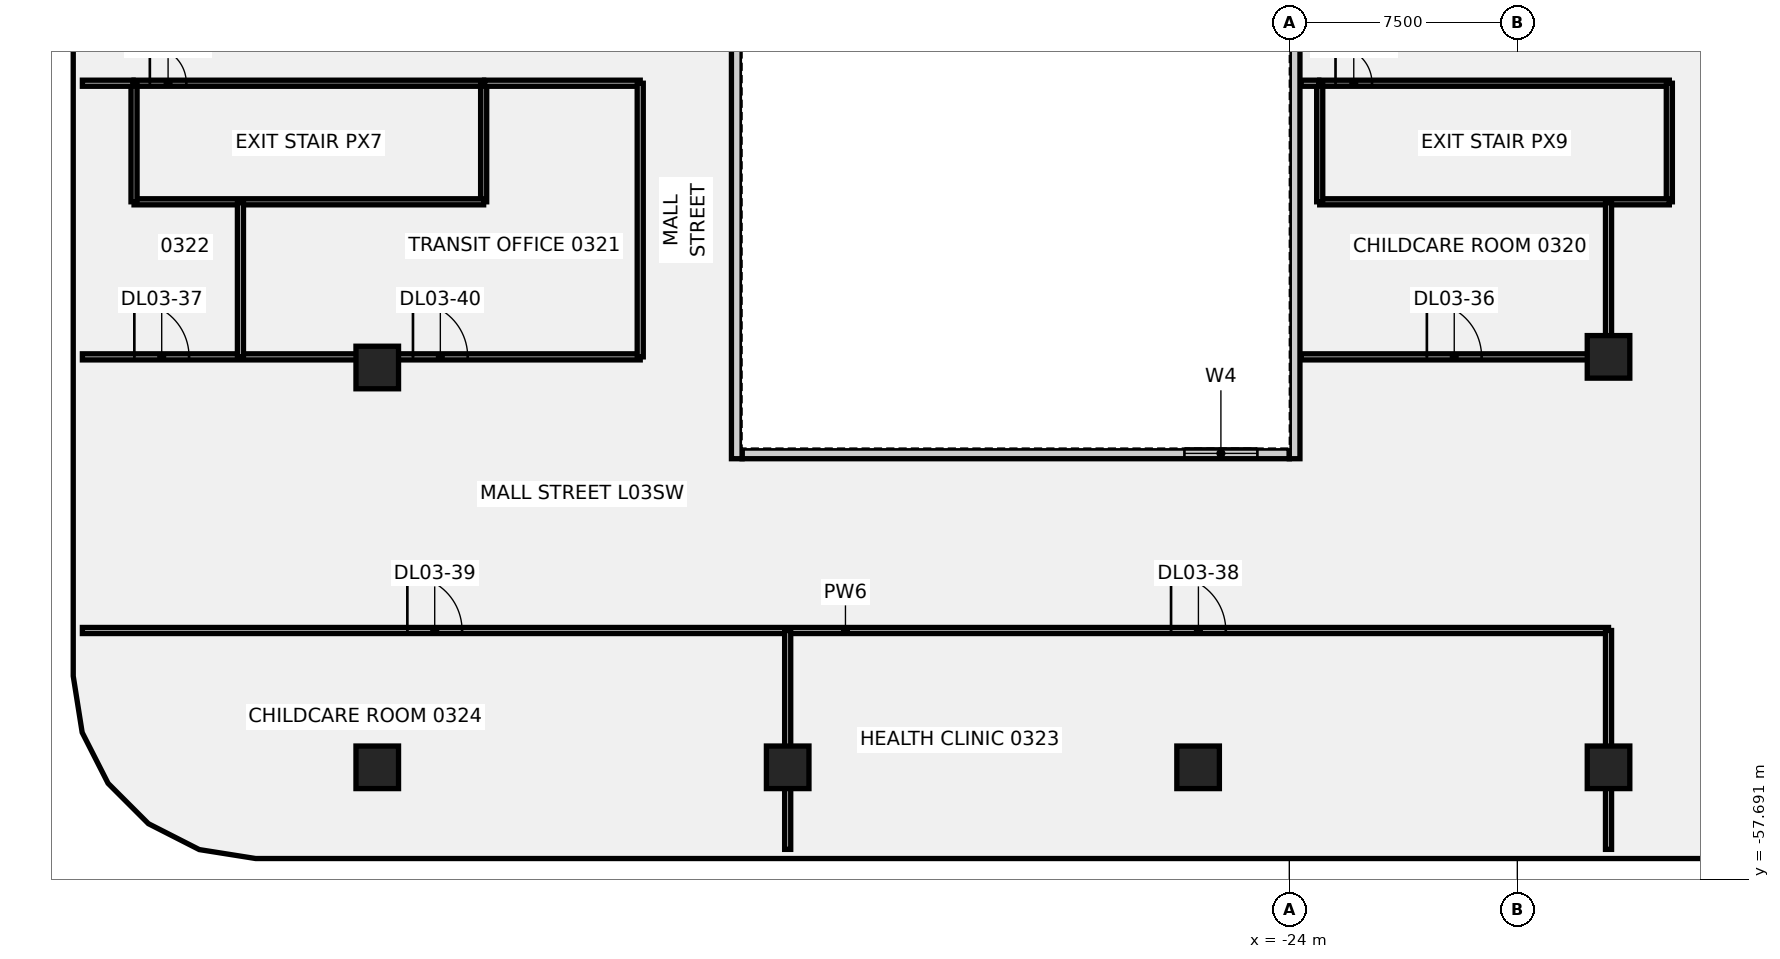
"""IFC4 building model, lengths in metres.
Left out: names, types, materials, properties, quantities, classifications, styles, units other than length and angle.
Written with IfcOpenShell. Run it as: python <this file> out.ifc"""

import sys

from ifc_helpers import new_model, si_unit, direction, frame, frame_2d, origin, origin_2d, place, context, subcontext, project, spatial, rectangle, extrude, element, fill, save


model = new_model("IFC4")
c1 = context("Model", 3, precision=1e-05, world=origin(), true_north=direction((0.0, 1.0)))
c2 = subcontext(c1, "Body", "Model", "MODEL_VIEW")
j1 = project(units=[si_unit("LENGTHUNIT", "METRE"), si_unit("PLANEANGLEUNIT", "RADIAN")], contexts=[c1])
p1 = place(None, origin())
s1 = spatial("IfcSite", under=j1, at=p1, CompositionType="ELEMENT")
p2 = place(p1, origin())
s2 = spatial("IfcBuilding", under=s1, at=p2, CompositionType="ELEMENT")
p3 = place(p2, frame((0.0, 0.0, 20.0)))
s3 = spatial("IfcBuildingStorey", under=s2, at=p3, CompositionType="ELEMENT", Elevation=20.0)
for number, where, z_axis, x_axis in (
    (1, (-54.0, -54.0, -0.5), (0.0, 0.0, 1.0), (1.0, 0.0, 0.0)),
    (2, (-54.0, -40.85, -0.5), (0.0, 0.0, 1.0), (1.0, 0.0, 0.0)),
    (3, (-40.5, -54.0, -0.5), (0.0, 0.0, 1.0), (1.0, 0.0, 0.0)),
    (4, (-27.0, -54.0, -0.5), (0.0, 0.0, 1.0), (1.0, 0.0, 0.0)),
    (5, (-13.5, -54.0, -0.5), (0.0, 0.0, 1.0), (1.0, 0.0, 0.0)),
    (6, (-13.5, -40.5, -0.5), (0.0, 0.0, 1.0), (1.0, 0.0, 0.0)),
):
    element("IfcColumn", number, at=place(p3, frame(where, z_axis=z_axis, x_axis=x_axis)), inside=s3, PredefinedType="COLUMN", context=c2, shape_type="SweptSolid", body=[
        extrude(rectangle(XDim=1.4, YDim=1.4, at=origin_2d()), origin(), (0.0, 0.0, 1.0), 5.05),
    ])
p4 = place(p3, frame((-62.0, -31.5, 0.0), z_axis=(0.0, 0.0, 1.0), x_axis=(1.0, 0.0, 0.0)))
e7 = element("IfcWall", 7, at=p4, inside=s3, PredefinedType="PARTITIONING", context=c2, shape_type="SweptSolid", body=[
    extrude(rectangle(XDim=11.5, YDim=0.2, at=frame_2d((5.75, 0.0))), origin(), (0.0, 0.0, 1.0), 4.55),
])
p5 = place(p4, frame((0.52, 0.0, 0.0)))
e8 = element("IfcOpeningElement", 8, at=p5, cuts=e7, PredefinedType="OPENING", context=c2, shape_type="SweptSolid", body=[
    extrude(rectangle(XDim=1.2, YDim=2.1, at=frame_2d((0.6, 1.05))), frame((0.0, 0.11, 0.0), z_axis=(0.0, -1.0, 0.0), x_axis=(1.0, 0.0, 0.0)), (0.0, 0.0, 1.0), 0.22),
])
p6 = place(p3, frame((-50.5, -35.4, 0.0), z_axis=(0.0, 0.0, 1.0), x_axis=(0.0, 1.0, 0.0)))
e9 = element("IfcWall", 9, at=p6, inside=s3, PredefinedType="PARTITIONING", context=c2, shape_type="SweptSolid", body=[
    extrude(rectangle(XDim=3.9, YDim=0.2, at=frame_2d((1.95, 0.0))), origin(), (0.0, 0.0, 1.0), 4.55),
])
p7 = place(p3, frame((-62.0, -35.4, 0.0), z_axis=(0.0, 0.0, 1.0), x_axis=(1.0, 0.0, 0.0)))
e10 = element("IfcWall", 10, at=p7, inside=s3, PredefinedType="PARTITIONING", context=c2, shape_type="SweptSolid", body=[
    extrude(rectangle(XDim=11.5, YDim=0.2, at=frame_2d((5.75, 0.0))), origin(), (0.0, 0.0, 1.0), 4.55),
])
p8 = place(p3, frame((-62.0, -35.4, 0.0), z_axis=(0.0, 0.0, 1.0), x_axis=(0.0, 1.0, 0.0)))
e11 = element("IfcWall", 11, at=p8, inside=s3, PredefinedType="PARTITIONING", context=c2, shape_type="SweptSolid", body=[
    extrude(rectangle(XDim=3.9, YDim=0.2, at=frame_2d((1.95, 0.0))), origin(), (0.0, 0.0, 1.0), 4.55),
])
p9 = place(p3, frame((-23.0, -31.5, 0.0), z_axis=(0.0, 0.0, 1.0), x_axis=(1.0, 0.0, 0.0)))
e12 = element("IfcWall", 12, at=p9, inside=s3, PredefinedType="PARTITIONING", context=c2, shape_type="SweptSolid", body=[
    extrude(rectangle(XDim=11.5, YDim=0.2, at=frame_2d((5.75, 0.0))), origin(), (0.0, 0.0, 1.0), 4.55),
])
p10 = place(p9, frame((0.52, 0.0, 0.0)))
e13 = element("IfcOpeningElement", 13, at=p10, cuts=e12, PredefinedType="OPENING", context=c2, shape_type="SweptSolid", body=[
    extrude(rectangle(XDim=1.2, YDim=2.1, at=frame_2d((0.6, 1.05))), frame((0.0, 0.11, 0.0), z_axis=(0.0, -1.0, 0.0), x_axis=(1.0, 0.0, 0.0)), (0.0, 0.0, 1.0), 0.22),
])
p11 = place(p3, frame((-11.5, -35.4, 0.0), z_axis=(0.0, 0.0, 1.0), x_axis=(0.0, 1.0, 0.0)))
e14 = element("IfcWall", 14, at=p11, inside=s3, PredefinedType="PARTITIONING", context=c2, shape_type="SweptSolid", body=[
    extrude(rectangle(XDim=3.9, YDim=0.2, at=frame_2d((1.95, 0.0))), origin(), (0.0, 0.0, 1.0), 4.55),
])
p12 = place(p3, frame((-23.0, -35.4, 0.0), z_axis=(0.0, 0.0, 1.0), x_axis=(1.0, 0.0, 0.0)))
e15 = element("IfcWall", 15, at=p12, inside=s3, PredefinedType="PARTITIONING", context=c2, shape_type="SweptSolid", body=[
    extrude(rectangle(XDim=11.5, YDim=0.2, at=frame_2d((5.75, 0.0))), origin(), (0.0, 0.0, 1.0), 4.55),
])
p13 = place(p3, frame((-23.0, -35.4, 0.0), z_axis=(0.0, 0.0, 1.0), x_axis=(0.0, 1.0, 0.0)))
e16 = element("IfcWall", 16, at=p13, inside=s3, PredefinedType="PARTITIONING", context=c2, shape_type="SweptSolid", body=[
    extrude(rectangle(XDim=3.9, YDim=0.2, at=frame_2d((1.95, 0.0))), origin(), (0.0, 0.0, 1.0), 4.55),
])
p14 = place(p3, frame((-63.699, -49.5, 0.0), z_axis=(0.0, 0.0, 1.0), x_axis=(1.0, 0.0, 0.0)))
e17 = element("IfcWall", 17, at=p14, inside=s3, PredefinedType="PARTITIONING", context=c2, shape_type="SweptSolid", body=[
    extrude(rectangle(XDim=50.199, YDim=0.2, at=frame_2d((25.1, 0.0))), origin(), (0.0, 0.0, 1.0), 4.55),
])
p15 = place(p14, frame((35.809, 0.0, 0.0)))
e18 = element("IfcOpeningElement", 18, at=p15, cuts=e17, PredefinedType="OPENING", context=c2, shape_type="SweptSolid", body=[
    extrude(rectangle(XDim=1.8, YDim=2.1, at=frame_2d((0.9, 1.05))), frame((0.0, 0.11, 0.0), z_axis=(0.0, -1.0, 0.0), x_axis=(1.0, 0.0, 0.0)), (0.0, 0.0, 1.0), 0.22),
])
p16 = place(p14, frame((10.689, 0.0, 0.0)))
e19 = element("IfcOpeningElement", 19, at=p16, cuts=e17, PredefinedType="OPENING", context=c2, shape_type="SweptSolid", body=[
    extrude(rectangle(XDim=1.8, YDim=2.1, at=frame_2d((0.9, 1.05))), frame((0.0, 0.11, 0.0), z_axis=(0.0, -1.0, 0.0), x_axis=(1.0, 0.0, 0.0)), (0.0, 0.0, 1.0), 0.22),
])
p17 = place(p3, frame((-63.699, -40.5, 0.0), z_axis=(0.0, 0.0, 1.0), x_axis=(1.0, 0.0, 0.0)))
e20 = element("IfcWall", 20, at=p17, inside=s3, PredefinedType="PARTITIONING", context=c2, shape_type="SweptSolid", body=[
    extrude(rectangle(XDim=18.349, YDim=0.2, at=frame_2d((9.174, 0.0))), origin(), (0.0, 0.0, 1.0), 4.55),
])
p18 = place(p17, frame((1.709, 0.0, 0.0)))
e21 = element("IfcOpeningElement", 21, at=p18, cuts=e20, PredefinedType="OPENING", context=c2, shape_type="SweptSolid", body=[
    extrude(rectangle(XDim=1.8, YDim=2.1, at=frame_2d((0.9, 1.05))), frame((0.0, 0.11, 0.0), z_axis=(0.0, -1.0, 0.0), x_axis=(1.0, 0.0, 0.0)), (0.0, 0.0, 1.0), 0.22),
])
p19 = place(p17, frame((10.874, 0.0, 0.0)))
e22 = element("IfcOpeningElement", 22, at=p19, cuts=e20, PredefinedType="OPENING", context=c2, shape_type="SweptSolid", body=[
    extrude(rectangle(XDim=1.8, YDim=2.1, at=frame_2d((0.9, 1.05))), frame((0.0, 0.11, 0.0), z_axis=(0.0, -1.0, 0.0), x_axis=(1.0, 0.0, 0.0)), (0.0, 0.0, 1.0), 0.22),
])
p20 = place(p3, frame((-63.699, -31.5, 0.0), z_axis=(0.0, 0.0, 1.0), x_axis=(1.0, 0.0, 0.0)))
e23 = element("IfcWall", 23, at=p20, inside=s3, PredefinedType="PARTITIONING", context=c2, shape_type="SweptSolid", body=[
    extrude(rectangle(XDim=1.669, YDim=0.2, at=frame_2d((0.834, 0.0))), origin(), (0.0, 0.0, 1.0), 4.55),
])
p21 = place(p3, frame((-50.47, -31.5, 0.0), z_axis=(0.0, 0.0, 1.0), x_axis=(1.0, 0.0, 0.0)))
e24 = element("IfcWall", 24, at=p21, inside=s3, PredefinedType="PARTITIONING", context=c2, shape_type="SweptSolid", body=[
    extrude(rectangle(XDim=5.12, YDim=0.2, at=frame_2d((2.56, 0.0))), origin(), (0.0, 0.0, 1.0), 4.55),
])
p22 = place(p3, frame((-45.35, -40.5, 0.0), z_axis=(0.0, 0.0, 1.0), x_axis=(0.0, 1.0, 0.0)))
e25 = element("IfcWall", 25, at=p22, inside=s3, PredefinedType="PARTITIONING", context=c2, shape_type="SweptSolid", body=[
    extrude(rectangle(XDim=9.0, YDim=0.2, at=frame_2d((4.5, 0.0))), origin(), (0.0, 0.0, 1.0), 4.55),
])
p23 = place(p3, frame((-58.5, -40.5, 0.0), z_axis=(0.0, 0.0, 1.0), x_axis=(0.0, 1.0, 0.0)))
e26 = element("IfcWall", 26, at=p23, inside=s3, PredefinedType="PARTITIONING", context=c2, shape_type="SweptSolid", body=[
    extrude(rectangle(XDim=5.07, YDim=0.2, at=frame_2d((2.535, 0.0))), origin(), (0.0, 0.0, 1.0), 4.55),
])
for number, where, z_axis, x_axis in (
    (27, (-40.5, -56.699, 0.0), (0.0, 0.0, 1.0), (0.0, 1.0, 0.0)),
    (28, (-13.5, -56.699, 0.0), (0.0, 0.0, 1.0), (0.0, 1.0, 0.0)),
):
    element("IfcWall", number, at=place(p3, frame(where, z_axis=z_axis, x_axis=x_axis)), inside=s3, PredefinedType="PARTITIONING", context=c2, shape_type="SweptSolid", body=[
        extrude(rectangle(XDim=7.199, YDim=0.2, at=frame_2d((3.6, 0.0))), origin(), (0.0, 0.0, 1.0), 4.55),
    ])
p24 = place(p3, frame((-13.5, -40.5, 0.0), z_axis=(0.0, 0.0, 1.0), x_axis=(0.0, 1.0, 0.0)))
e29 = element("IfcWall", 29, at=p24, inside=s3, PredefinedType="PARTITIONING", context=c2, shape_type="SweptSolid", body=[
    extrude(rectangle(XDim=5.07, YDim=0.2, at=frame_2d((2.535, 0.0))), origin(), (0.0, 0.0, 1.0), 4.55),
])
p25 = place(p3, frame((-23.62, -40.5, 0.0), z_axis=(0.0, 0.0, 1.0), x_axis=(1.0, 0.0, 0.0)))
e30 = element("IfcWall", 30, at=p25, inside=s3, PredefinedType="PARTITIONING", context=c2, shape_type="SweptSolid", body=[
    extrude(rectangle(XDim=10.12, YDim=0.2, at=frame_2d((5.06, 0.0))), origin(), (0.0, 0.0, 1.0), 4.55),
])
p26 = place(p25, frame((4.145, 0.0, 0.0)))
e31 = element("IfcOpeningElement", 31, at=p26, cuts=e30, PredefinedType="OPENING", context=c2, shape_type="SweptSolid", body=[
    extrude(rectangle(XDim=1.8, YDim=2.1, at=frame_2d((0.9, 1.05))), frame((0.0, 0.11, 0.0), z_axis=(0.0, -1.0, 0.0), x_axis=(1.0, 0.0, 0.0)), (0.0, 0.0, 1.0), 0.22),
])
p27 = place(p3, frame((-23.62, -31.5, 0.0), z_axis=(0.0, 0.0, 1.0), x_axis=(1.0, 0.0, 0.0)))
e32 = element("IfcWall", 32, at=p27, inside=s3, PredefinedType="PARTITIONING", context=c2, shape_type="SweptSolid", body=[
    extrude(rectangle(XDim=0.59, YDim=0.2, at=frame_2d((0.295, 0.0))), origin(), (0.0, 0.0, 1.0), 4.55),
])
p28 = place(p3, frame((-42.0, -43.675, 0.0), z_axis=(0.0, 0.0, 1.0), x_axis=(1.0, 0.0, 0.0)))
e33 = element("IfcWall", 33, at=p28, inside=s3, PredefinedType="SOLIDWALL", context=c2, shape_type="SweptSolid", body=[
    extrude(rectangle(XDim=18.0, YDim=0.35, at=frame_2d((9.0, 0.0))), origin(), (0.0, 0.0, 1.0), 4.55),
])
p29 = place(p28, frame((14.55, 0.0, 1.0)))
e34 = element("IfcOpeningElement", 34, at=p29, cuts=e33, PredefinedType="OPENING", context=c2, shape_type="SweptSolid", body=[
    extrude(rectangle(XDim=2.4, YDim=1.8, at=frame_2d((1.2, 0.9))), frame((0.0, 0.185, 0.0), z_axis=(0.0, -1.0, 0.0), x_axis=(1.0, 0.0, 0.0)), (0.0, 0.0, 1.0), 0.37),
])
p30 = place(p3, frame((-42.175, -43.85, 0.0), z_axis=(0.0, 0.0, 1.0), x_axis=(0.0, 1.0, 0.0)))
e35 = element("IfcWall", 35, at=p30, inside=s3, PredefinedType="SOLIDWALL", context=c2, shape_type="SweptSolid", body=[
    extrude(rectangle(XDim=27.4, YDim=0.35, at=frame_2d((13.7, 0.0))), origin(), (0.0, 0.0, 1.0), 4.55),
])
p31 = place(p30, frame((14.9, 0.0, 1.0)))
e36 = element("IfcOpeningElement", 36, at=p31, cuts=e35, PredefinedType="OPENING", context=c2, shape_type="SweptSolid", body=[
    extrude(rectangle(XDim=2.4, YDim=1.8, at=frame_2d((1.2, 0.9))), frame((0.0, 0.185, 0.0), z_axis=(0.0, -1.0, 0.0), x_axis=(1.0, 0.0, 0.0)), (0.0, 0.0, 1.0), 0.37),
])
p32 = place(p3, frame((-23.825, -43.85, 0.0), z_axis=(0.0, 0.0, 1.0), x_axis=(0.0, 1.0, 0.0)))
e37 = element("IfcWall", 37, at=p32, inside=s3, PredefinedType="SOLIDWALL", context=c2, shape_type="SweptSolid", body=[
    extrude(rectangle(XDim=27.4, YDim=0.35, at=frame_2d((13.7, 0.0))), origin(), (0.0, 0.0, 1.0), 4.55),
])
p33 = place(p32, frame((14.9, 0.0, 1.0)))
e38 = element("IfcOpeningElement", 38, at=p33, cuts=e37, PredefinedType="OPENING", context=c2, shape_type="SweptSolid", body=[
    extrude(rectangle(XDim=2.4, YDim=1.8, at=frame_2d((1.2, 0.9))), frame((0.0, 0.185, 0.0), z_axis=(0.0, -1.0, 0.0), x_axis=(1.0, 0.0, 0.0)), (0.0, 0.0, 1.0), 0.37),
])
p34 = place(p5, origin())
e39 = element("IfcDoor", 39, at=p34, inside=s3, OperationType="SINGLE_SWING_LEFT", PredefinedType="DOOR", context=c2, shape_type="SweptSolid", body=[
    extrude(rectangle(XDim=1.2, YDim=2.1, at=frame_2d((0.6, 1.05))), frame((0.0, 0.025, 0.0), z_axis=(0.0, -1.0, 0.0), x_axis=(1.0, 0.0, 0.0)), (0.0, 0.0, 1.0), 0.05),
])
fill(e8, e39)
p35 = place(p10, origin())
e40 = element("IfcDoor", 40, at=p35, inside=s3, OperationType="SINGLE_SWING_LEFT", PredefinedType="DOOR", context=c2, shape_type="SweptSolid", body=[
    extrude(rectangle(XDim=1.2, YDim=2.1, at=frame_2d((0.6, 1.05))), frame((0.0, 0.025, 0.0), z_axis=(0.0, -1.0, 0.0), x_axis=(1.0, 0.0, 0.0)), (0.0, 0.0, 1.0), 0.05),
])
fill(e13, e40)
p36 = place(p26, origin())
e41 = element("IfcDoor", 41, at=p36, inside=s3, OperationType="SINGLE_SWING_RIGHT", PredefinedType="DOOR", context=c2, shape_type="SweptSolid", body=[
    extrude(rectangle(XDim=1.8, YDim=2.1, at=frame_2d((0.9, 1.05))), frame((0.0, 0.025, 0.0), z_axis=(0.0, -1.0, 0.0), x_axis=(1.0, 0.0, 0.0)), (0.0, 0.0, 1.0), 0.05),
])
fill(e31, e41)
p37 = place(p18, origin())
e42 = element("IfcDoor", 42, at=p37, inside=s3, OperationType="SINGLE_SWING_LEFT", PredefinedType="DOOR", context=c2, shape_type="SweptSolid", body=[
    extrude(rectangle(XDim=1.8, YDim=2.1, at=frame_2d((0.9, 1.05))), frame((0.0, 0.025, 0.0), z_axis=(0.0, -1.0, 0.0), x_axis=(1.0, 0.0, 0.0)), (0.0, 0.0, 1.0), 0.05),
])
fill(e21, e42)
p38 = place(p15, origin())
e43 = element("IfcDoor", 43, at=p38, inside=s3, OperationType="SINGLE_SWING_RIGHT", PredefinedType="DOOR", context=c2, shape_type="SweptSolid", body=[
    extrude(rectangle(XDim=1.8, YDim=2.1, at=frame_2d((0.9, 1.05))), frame((0.0, 0.025, 0.0), z_axis=(0.0, -1.0, 0.0), x_axis=(1.0, 0.0, 0.0)), (0.0, 0.0, 1.0), 0.05),
])
fill(e18, e43)
p39 = place(p16, origin())
e44 = element("IfcDoor", 44, at=p39, inside=s3, OperationType="SINGLE_SWING_LEFT", PredefinedType="DOOR", context=c2, shape_type="SweptSolid", body=[
    extrude(rectangle(XDim=1.8, YDim=2.1, at=frame_2d((0.9, 1.05))), frame((0.0, 0.025, 0.0), z_axis=(0.0, -1.0, 0.0), x_axis=(1.0, 0.0, 0.0)), (0.0, 0.0, 1.0), 0.05),
])
fill(e19, e44)
p40 = place(p19, origin())
e45 = element("IfcDoor", 45, at=p40, inside=s3, OperationType="SINGLE_SWING_RIGHT", PredefinedType="DOOR", context=c2, shape_type="SweptSolid", body=[
    extrude(rectangle(XDim=1.8, YDim=2.1, at=frame_2d((0.9, 1.05))), frame((0.0, 0.025, 0.0), z_axis=(0.0, -1.0, 0.0), x_axis=(1.0, 0.0, 0.0)), (0.0, 0.0, 1.0), 0.05),
])
fill(e22, e45)
p41 = place(p29, origin())
e46 = element("IfcWindow", 46, at=p41, inside=s3, PartitioningType="SINGLE_PANEL", PredefinedType="WINDOW", context=c2, shape_type="SweptSolid", body=[
    extrude(rectangle(XDim=2.4, YDim=1.8, at=frame_2d((1.2, 0.9))), frame((0.0, 0.03, 0.0), z_axis=(0.0, -1.0, 0.0), x_axis=(1.0, 0.0, 0.0)), (0.0, 0.0, 1.0), 0.06),
])
fill(e34, e46)
save(model, sys.argv[1])
